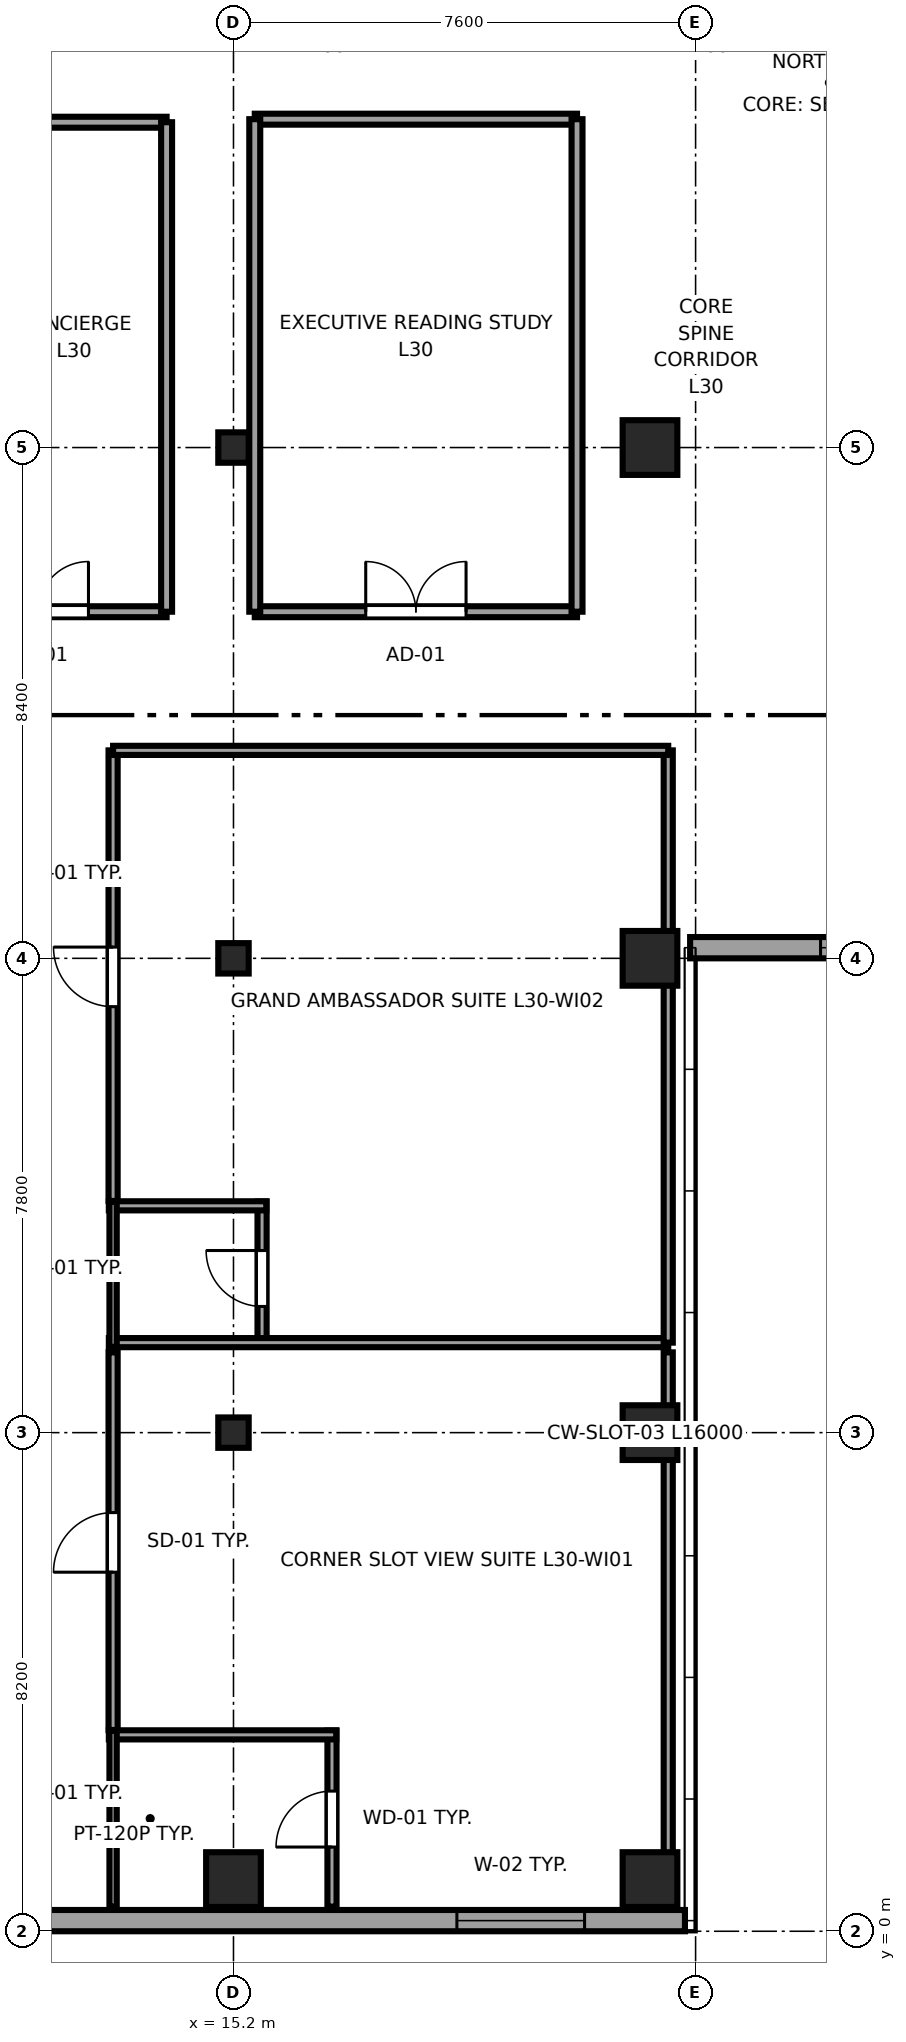
"""IFC4 building model, lengths in metres.
Left out: names, types, materials, properties, quantities, classifications, styles, units other than length and angle.
Written with IfcOpenShell. Run it as: python <this file> out.ifc"""

import sys

from ifc_helpers import new_model, si_unit, direction, frame, frame_2d, origin, origin_2d, place, context, subcontext, project, spatial, rectangle, i_section, extrude, source, transform, mapped, element, fill, save


model = new_model("IFC4")
c1 = context("Model", 3, precision=1e-05, world=origin(), true_north=direction((0.0, 1.0)))
c2 = subcontext(c1, "Body", "Model", "MODEL_VIEW")
j1 = project(units=[si_unit("LENGTHUNIT", "METRE"), si_unit("PLANEANGLEUNIT", "RADIAN")], contexts=[c1])
p1 = place(None, origin())
s1 = spatial("IfcSite", under=j1, at=p1, CompositionType="ELEMENT")
p2 = place(p1, origin())
s2 = spatial("IfcBuilding", under=s1, at=p2, CompositionType="ELEMENT")
p3 = place(p2, frame((0.0, 0.0, 118.65)))
s3 = spatial("IfcBuildingStorey", under=s2, at=p3, CompositionType="ELEMENT", Elevation=118.65)
m1 = source(origin(), c2, "Body", "SweptSolid", [
    extrude(rectangle(XDim=0.9, YDim=0.9, at=origin_2d()), origin(), (0.0, 0.0, 1.0), 3.55),
])
p4 = place(p3, frame((15.2, 0.85, 0.0), z_axis=(0.0, 0.0, 1.0), x_axis=(1.0, 0.0, 0.0)))
e1 = element("IfcColumn", 1, at=p4, inside=s3, PredefinedType="COLUMN", context=c2, shape_type="MappedRepresentation", body=[
    mapped(m1, transform((0.0, 0.0, 0.0), x_axis=(1.0, 0.0, 0.0), y_axis=(0.0, 1.0, 0.0), z_axis=(0.0, 0.0, 1.0), scale=1.0)),
])
m2 = source(origin(), c2, "Body", "SweptSolid", [
    extrude(i_section(OverallWidth=0.5, OverallDepth=0.5, WebThickness=0.022, FlangeThickness=0.034, at=origin_2d()), origin(), (0.0, 0.0, 1.0), 3.55),
])
for number, where, z_axis, x_axis in (
    (2, (15.2, 8.2, 0.0), (0.0, 0.0, 1.0), (1.0, 0.0, 0.0)),
    (3, (15.2, 16.0, 0.0), (0.0, 0.0, 1.0), (1.0, 0.0, 0.0)),
    (4, (15.2, 24.4, 0.0), (0.0, 0.0, 1.0), (1.0, 0.0, 0.0)),
):
    element("IfcColumn", number, at=place(p3, frame(where, z_axis=z_axis, x_axis=x_axis)), inside=s3, PredefinedType="COLUMN", context=c2, shape_type="MappedRepresentation", body=[
        mapped(m2, transform((0.0, 0.0, 0.0), x_axis=(1.0, 0.0, 0.0), y_axis=(0.0, 1.0, 0.0), z_axis=(0.0, 0.0, 1.0), scale=1.0)),
    ])
for number, where, z_axis, x_axis in (
    (5, (22.05, 0.85, 0.0), (0.0, 0.0, 1.0), (1.0, 0.0, 0.0)),
    (6, (22.05, 8.2, 0.0), (0.0, 0.0, 1.0), (1.0, 0.0, 0.0)),
    (7, (22.05, 16.0, 0.0), (0.0, 0.0, 1.0), (1.0, 0.0, 0.0)),
    (8, (22.05, 24.4, 0.0), (0.0, 0.0, 1.0), (1.0, 0.0, 0.0)),
):
    element("IfcColumn", number, at=place(p3, frame(where, z_axis=z_axis, x_axis=x_axis)), inside=s3, PredefinedType="COLUMN", context=c2, shape_type="MappedRepresentation", body=[
        mapped(m1, transform((0.0, 0.0, 0.0), x_axis=(1.0, 0.0, 0.0), y_axis=(0.0, 1.0, 0.0), z_axis=(0.0, 0.0, 1.0), scale=1.0)),
    ])
p5 = place(p3, frame((4.617, 0.175, 0.0), z_axis=(0.0, 0.0, 1.0), x_axis=(1.0, 0.0, 0.0)))
e9 = element("IfcWall", 9, at=p5, inside=s3, PredefinedType="SOLIDWALL", context=c2, shape_type="SweptSolid", body=[
    extrude(rectangle(XDim=18.008, YDim=0.35, at=frame_2d((9.004, 0.0))), origin(), (0.0, 0.0, 1.0), 3.37),
])
p6 = place(p5, frame((14.257, 0.0, 0.68)))
e10 = element("IfcOpeningElement", 10, at=p6, cuts=e9, PredefinedType="OPENING", context=c2, shape_type="SweptSolid", body=[
    extrude(rectangle(XDim=2.1, YDim=1.9, at=frame_2d((1.05, 0.95))), frame((0.0, 0.185, 0.0), z_axis=(0.0, -1.0, 0.0), x_axis=(1.0, 0.0, 0.0)), (0.0, 0.0, 1.0), 0.37),
])
p7 = place(p5, frame((2.591, 0.0, 0.62)))
e11 = element("IfcOpeningElement", 11, at=p7, cuts=e9, PredefinedType="OPENING", context=c2, shape_type="SweptSolid", body=[
    extrude(rectangle(XDim=1.5, YDim=1.55, at=frame_2d((0.75, 0.775))), frame((0.0, 0.185, 0.0), z_axis=(0.0, -1.0, 0.0), x_axis=(1.0, 0.0, 0.0)), (0.0, 0.0, 1.0), 0.37),
])
p8 = place(p3, frame((22.71, 16.175, 0.0), z_axis=(0.0, 0.0, 1.0), x_axis=(1.0, 0.0, 0.0)))
e12 = element("IfcWall", 12, at=p8, inside=s3, PredefinedType="SOLIDWALL", context=c2, shape_type="SweptSolid", body=[
    extrude(rectangle(XDim=11.58, YDim=0.35, at=frame_2d((5.79, 0.0))), origin(), (0.0, 0.0, 1.0), 2.748),
])
p9 = place(p8, frame((2.145, 0.0, 0.68)))
e13 = element("IfcOpeningElement", 13, at=p9, cuts=e12, PredefinedType="OPENING", context=c2, shape_type="SweptSolid", body=[
    extrude(rectangle(XDim=2.1, YDim=1.9, at=frame_2d((1.05, 0.95))), frame((0.0, 0.185, 0.0), z_axis=(0.0, -1.0, 0.0), x_axis=(1.0, 0.0, 0.0)), (0.0, 0.0, 1.0), 0.37),
])
p10 = place(p8, frame((7.335, 0.0, 0.68)))
e14 = element("IfcOpeningElement", 14, at=p10, cuts=e12, PredefinedType="OPENING", context=c2, shape_type="SweptSolid", body=[
    extrude(rectangle(XDim=2.1, YDim=1.9, at=frame_2d((1.05, 0.95))), frame((0.0, 0.185, 0.0), z_axis=(0.0, -1.0, 0.0), x_axis=(1.0, 0.0, 0.0)), (0.0, 0.0, 1.0), 0.37),
])
p11 = place(p3, frame((16.82, 0.405, 0.0), z_axis=(0.0, 0.0, 1.0), x_axis=(0.0, 1.0, 0.0)))
e15 = element("IfcWall", 15, at=p11, inside=s3, PredefinedType="PARTITIONING", context=c2, shape_type="SweptSolid", body=[
    extrude(rectangle(XDim=2.895, YDim=0.15, at=frame_2d((1.448, 0.0))), origin(), (0.0, 0.0, 1.0), 3.37),
])
p12 = place(p11, frame((0.98, 0.0, 0.0)))
e16 = element("IfcOpeningElement", 16, at=p12, cuts=e15, PredefinedType="OPENING", context=c2, shape_type="SweptSolid", body=[
    extrude(rectangle(XDim=0.92, YDim=2.01, at=frame_2d((0.46, 1.005))), frame((0.0, 0.085, 0.0), z_axis=(0.0, -1.0, 0.0), x_axis=(1.0, 0.0, 0.0)), (0.0, 0.0, 1.0), 0.17),
])
p13 = place(p3, frame((13.15, 3.23, 0.0), z_axis=(0.0, 0.0, 1.0), x_axis=(1.0, 0.0, 0.0)))
e17 = element("IfcWall", 17, at=p13, inside=s3, PredefinedType="PARTITIONING", context=c2, shape_type="SweptSolid", body=[
    extrude(rectangle(XDim=3.74, YDim=0.15, at=frame_2d((1.87, 0.0))), origin(), (0.0, 0.0, 1.0), 3.37),
])
p14 = place(p3, frame((13.22, 0.405, 0.0), z_axis=(0.0, 0.0, 1.0), x_axis=(0.0, 1.0, 0.0)))
e18 = element("IfcWall", 18, at=p14, inside=s3, PredefinedType="PLUMBINGWALL", context=c2, shape_type="SweptSolid", body=[
    extrude(rectangle(XDim=2.895, YDim=0.12, at=frame_2d((1.448, 0.0))), origin(), (0.0, 0.0, 1.0), 3.37),
])
p15 = place(p3, frame((15.67, 9.61, 0.0), z_axis=(0.0, 0.0, 1.0), x_axis=(0.0, 1.0, 0.0)))
e19 = element("IfcWall", 19, at=p15, inside=s3, PredefinedType="PARTITIONING", context=c2, shape_type="SweptSolid", body=[
    extrude(rectangle(XDim=2.39, YDim=0.15, at=frame_2d((1.195, 0.0))), origin(), (0.0, 0.0, 1.0), 3.37),
])
p16 = place(p15, frame((0.665, 0.0, 0.0)))
e20 = element("IfcOpeningElement", 20, at=p16, cuts=e19, PredefinedType="OPENING", context=c2, shape_type="SweptSolid", body=[
    extrude(rectangle(XDim=0.92, YDim=2.01, at=frame_2d((0.46, 1.005))), frame((0.0, 0.085, 0.0), z_axis=(0.0, -1.0, 0.0), x_axis=(1.0, 0.0, 0.0)), (0.0, 0.0, 1.0), 0.17),
])
p17 = place(p3, frame((13.15, 9.68, 0.0), z_axis=(0.0, 0.0, 1.0), x_axis=(1.0, 0.0, 0.0)))
e21 = element("IfcWall", 21, at=p17, inside=s3, PredefinedType="PARTITIONING", context=c2, shape_type="SweptSolid", body=[
    extrude(rectangle(XDim=9.2, YDim=0.15, at=frame_2d((4.6, 0.0))), origin(), (0.0, 0.0, 1.0), 3.37),
])
p18 = place(p3, frame((13.15, 11.93, 0.0), z_axis=(0.0, 0.0, 1.0), x_axis=(1.0, 0.0, 0.0)))
e22 = element("IfcWall", 22, at=p18, inside=s3, PredefinedType="PARTITIONING", context=c2, shape_type="SweptSolid", body=[
    extrude(rectangle(XDim=2.59, YDim=0.15, at=frame_2d((1.295, 0.0))), origin(), (0.0, 0.0, 1.0), 3.37),
])
p19 = place(p3, frame((13.22, 9.61, 0.0), z_axis=(0.0, 0.0, 1.0), x_axis=(0.0, 1.0, 0.0)))
e23 = element("IfcWall", 23, at=p19, inside=s3, PredefinedType="PLUMBINGWALL", context=c2, shape_type="SweptSolid", body=[
    extrude(rectangle(XDim=2.39, YDim=0.12, at=frame_2d((1.195, 0.0))), origin(), (0.0, 0.0, 1.0), 3.37),
])
p20 = place(p3, frame((13.22, 3.31, 0.0), z_axis=(0.0, 0.0, 1.0), x_axis=(0.0, 1.0, 0.0)))
e24 = element("IfcWall", 24, at=p20, inside=s3, PredefinedType="PARTITIONING", context=c2, shape_type="SweptSolid", body=[
    extrude(rectangle(XDim=6.21, YDim=0.15, at=frame_2d((3.105, 0.0))), origin(), (0.0, 0.0, 1.0), 3.37),
])
p21 = place(p20, frame((2.595, 0.0, 0.0)))
e25 = element("IfcOpeningElement", 25, at=p21, cuts=e24, PredefinedType="OPENING", context=c2, shape_type="SweptSolid", body=[
    extrude(rectangle(XDim=0.98, YDim=2.12, at=frame_2d((0.49, 1.06))), frame((0.0, 0.085, 0.0), z_axis=(0.0, -1.0, 0.0), x_axis=(1.0, 0.0, 0.0)), (0.0, 0.0, 1.0), 0.17),
])
p22 = place(p3, frame((22.35, 0.405, 0.0), z_axis=(0.0, 0.0, 1.0), x_axis=(0.0, 1.0, 0.0)))
e26 = element("IfcWall", 26, at=p22, inside=s3, PredefinedType="PARTITIONING", context=c2, shape_type="SweptSolid", body=[
    extrude(rectangle(XDim=9.115, YDim=0.15, at=frame_2d((4.558, 0.0))), origin(), (0.0, 0.0, 1.0), 3.37),
])
p23 = place(p3, frame((13.22, 12.01, 0.0), z_axis=(0.0, 0.0, 1.0), x_axis=(0.0, 1.0, 0.0)))
e27 = element("IfcWall", 27, at=p23, inside=s3, PredefinedType="PARTITIONING", context=c2, shape_type="SweptSolid", body=[
    extrude(rectangle(XDim=7.41, YDim=0.15, at=frame_2d((3.705, 0.0))), origin(), (0.0, 0.0, 1.0), 3.37),
])
p24 = place(p23, frame((3.195, 0.0, 0.0)))
e28 = element("IfcOpeningElement", 28, at=p24, cuts=e27, PredefinedType="OPENING", context=c2, shape_type="SweptSolid", body=[
    extrude(rectangle(XDim=0.98, YDim=2.12, at=frame_2d((0.49, 1.06))), frame((0.0, 0.085, 0.0), z_axis=(0.0, -1.0, 0.0), x_axis=(1.0, 0.0, 0.0)), (0.0, 0.0, 1.0), 0.17),
])
p25 = place(p3, frame((22.35, 9.68, 0.0), z_axis=(0.0, 0.0, 1.0), x_axis=(0.0, 1.0, 0.0)))
e29 = element("IfcWall", 29, at=p25, inside=s3, PredefinedType="PARTITIONING", context=c2, shape_type="SweptSolid", body=[
    extrude(rectangle(XDim=9.74, YDim=0.15, at=frame_2d((4.87, 0.0))), origin(), (0.0, 0.0, 1.0), 3.37),
])
p26 = place(p3, frame((13.22, 19.42, 0.0), z_axis=(0.0, 0.0, 1.0), x_axis=(1.0, 0.0, 0.0)))
e30 = element("IfcWall", 30, at=p26, inside=s3, PredefinedType="PARTITIONING", context=c2, shape_type="SweptSolid", body=[
    extrude(rectangle(XDim=9.13, YDim=0.15, at=frame_2d((4.565, 0.0))), origin(), (0.0, 0.0, 1.0), 3.37),
])
p27 = place(p3, frame((9.88, 21.7, 0.0), z_axis=(0.0, 0.0, 1.0), x_axis=(1.0, 0.0, 0.0)))
e31 = element("IfcWall", 31, at=p27, inside=s3, PredefinedType="PARTITIONING", context=c2, shape_type="SweptSolid", body=[
    extrude(rectangle(XDim=4.22, YDim=0.18, at=frame_2d((2.11, 0.0))), origin(), (0.0, 0.0, 1.0), 3.37),
])
p28 = place(p27, frame((1.285, 0.0, 0.0)))
e32 = element("IfcOpeningElement", 32, at=p28, cuts=e31, PredefinedType="OPENING", context=c2, shape_type="SweptSolid", body=[
    extrude(rectangle(XDim=1.65, YDim=2.15, at=frame_2d((0.825, 1.075))), frame((0.0, 0.1, 0.0), z_axis=(0.0, -1.0, 0.0), x_axis=(1.0, 0.0, 0.0)), (0.0, 0.0, 1.0), 0.2),
])
p29 = place(p3, frame((9.88, 29.75, 0.0), z_axis=(0.0, 0.0, 1.0), x_axis=(1.0, 0.0, 0.0)))
e33 = element("IfcWall", 33, at=p29, inside=s3, PredefinedType="PARTITIONING", context=c2, shape_type="SweptSolid", body=[
    extrude(rectangle(XDim=4.22, YDim=0.18, at=frame_2d((2.11, 0.0))), origin(), (0.0, 0.0, 1.0), 3.37),
])
p30 = place(p3, frame((14.1, 21.7, 0.0), z_axis=(0.0, 0.0, 1.0), x_axis=(0.0, 1.0, 0.0)))
e34 = element("IfcWall", 34, at=p30, inside=s3, PredefinedType="PARTITIONING", context=c2, shape_type="SweptSolid", body=[
    extrude(rectangle(XDim=8.05, YDim=0.18, at=frame_2d((4.025, 0.0))), origin(), (0.0, 0.0, 1.0), 3.37),
])
p31 = place(p3, frame((15.55, 21.7, 0.0), z_axis=(0.0, 0.0, 1.0), x_axis=(1.0, 0.0, 0.0)))
e35 = element("IfcWall", 35, at=p31, inside=s3, PredefinedType="PARTITIONING", context=c2, shape_type="SweptSolid", body=[
    extrude(rectangle(XDim=5.3, YDim=0.18, at=frame_2d((2.65, 0.0))), origin(), (0.0, 0.0, 1.0), 3.37),
])
p32 = place(p31, frame((1.825, 0.0, 0.0)))
e36 = element("IfcOpeningElement", 36, at=p32, cuts=e35, PredefinedType="OPENING", context=c2, shape_type="SweptSolid", body=[
    extrude(rectangle(XDim=1.65, YDim=2.15, at=frame_2d((0.825, 1.075))), frame((0.0, 0.1, 0.0), z_axis=(0.0, -1.0, 0.0), x_axis=(1.0, 0.0, 0.0)), (0.0, 0.0, 1.0), 0.2),
])
p33 = place(p3, frame((15.55, 29.8, 0.0), z_axis=(0.0, 0.0, 1.0), x_axis=(1.0, 0.0, 0.0)))
e37 = element("IfcWall", 37, at=p33, inside=s3, PredefinedType="PARTITIONING", context=c2, shape_type="SweptSolid", body=[
    extrude(rectangle(XDim=5.3, YDim=0.18, at=frame_2d((2.65, 0.0))), origin(), (0.0, 0.0, 1.0), 3.37),
])
for number, where, z_axis, x_axis in (
    (38, (15.55, 21.7, 0.0), (0.0, 0.0, 1.0), (0.0, 1.0, 0.0)),
    (39, (20.85, 21.7, 0.0), (0.0, 0.0, 1.0), (0.0, 1.0, 0.0)),
):
    element("IfcWall", number, at=place(p3, frame(where, z_axis=z_axis, x_axis=x_axis)), inside=s3, PredefinedType="PARTITIONING", context=c2, shape_type="SweptSolid", body=[
        extrude(rectangle(XDim=8.1, YDim=0.18, at=frame_2d((4.05, 0.0))), origin(), (0.0, 0.0, 1.0), 3.37),
    ])
m3 = source(origin(), c2, "Body", "SweptSolid", [
    extrude(rectangle(XDim=2.1, YDim=1.9, at=frame_2d((1.05, 0.95))), frame((0.0, 0.09, 0.0), z_axis=(0.0, -1.0, 0.0), x_axis=(1.0, 0.0, 0.0)), (0.0, 0.0, 1.0), 0.06),
])
p34 = place(p6, origin())
e40 = element("IfcWindow", 40, at=p34, inside=s3, PartitioningType="TRIPLE_PANEL_HORIZONTAL", PredefinedType="WINDOW", context=c2, shape_type="MappedRepresentation", body=[
    mapped(m3, transform((0.0, 0.0, 0.0), x_axis=(1.0, 0.0, 0.0), y_axis=(0.0, 1.0, 0.0), z_axis=(0.0, 0.0, 1.0), scale=1.0)),
])
fill(e10, e40)
p35 = place(p9, origin())
e41 = element("IfcWindow", 41, at=p35, inside=s3, PartitioningType="TRIPLE_PANEL_HORIZONTAL", PredefinedType="WINDOW", context=c2, shape_type="MappedRepresentation", body=[
    mapped(m3, transform((0.0, 0.0, 0.0), x_axis=(1.0, 0.0, 0.0), y_axis=(0.0, 1.0, 0.0), z_axis=(0.0, 0.0, 1.0), scale=1.0)),
])
fill(e13, e41)
m4 = source(origin(), c2, "Body", "SweptSolid", [
    extrude(rectangle(XDim=0.92, YDim=2.01, at=frame_2d((0.46, 1.005))), frame((0.0, 0.025, 0.0), z_axis=(0.0, -1.0, 0.0), x_axis=(1.0, 0.0, 0.0)), (0.0, 0.0, 1.0), 0.05),
])
p36 = place(p12, origin())
e42 = element("IfcDoor", 42, at=p36, inside=s3, OperationType="SINGLE_SWING_LEFT", PredefinedType="DOOR", context=c2, shape_type="MappedRepresentation", body=[
    mapped(m4, transform((0.0, 0.0, 0.0), x_axis=(1.0, 0.0, 0.0), y_axis=(0.0, 1.0, 0.0), z_axis=(0.0, 0.0, 1.0), scale=1.0)),
])
fill(e16, e42)
p37 = place(p16, origin())
e43 = element("IfcDoor", 43, at=p37, inside=s3, OperationType="SINGLE_SWING_RIGHT", PredefinedType="DOOR", context=c2, shape_type="MappedRepresentation", body=[
    mapped(m4, transform((0.0, 0.0, 0.0), x_axis=(1.0, 0.0, 0.0), y_axis=(0.0, 1.0, 0.0), z_axis=(0.0, 0.0, 1.0), scale=1.0)),
])
fill(e20, e43)
m5 = source(origin(), c2, "Body", "SweptSolid", [
    extrude(rectangle(XDim=0.98, YDim=2.12, at=frame_2d((0.49, 1.06))), frame((0.0, 0.025, 0.0), z_axis=(0.0, -1.0, 0.0), x_axis=(1.0, 0.0, 0.0)), (0.0, 0.0, 1.0), 0.05),
])
p38 = place(p21, origin())
e44 = element("IfcDoor", 44, at=p38, inside=s3, OperationType="SINGLE_SWING_LEFT", PredefinedType="DOOR", context=c2, shape_type="MappedRepresentation", body=[
    mapped(m5, transform((0.0, 0.0, 0.0), x_axis=(1.0, 0.0, 0.0), y_axis=(0.0, 1.0, 0.0), z_axis=(0.0, 0.0, 1.0), scale=1.0)),
])
fill(e25, e44)
p39 = place(p24, origin())
e45 = element("IfcDoor", 45, at=p39, inside=s3, OperationType="SINGLE_SWING_RIGHT", PredefinedType="DOOR", context=c2, shape_type="MappedRepresentation", body=[
    mapped(m5, transform((0.0, 0.0, 0.0), x_axis=(1.0, 0.0, 0.0), y_axis=(0.0, 1.0, 0.0), z_axis=(0.0, 0.0, 1.0), scale=1.0)),
])
fill(e28, e45)
m6 = source(origin(), c2, "Body", "SweptSolid", [
    extrude(rectangle(XDim=1.65, YDim=2.15, at=frame_2d((0.825, 1.075))), frame((0.0, 0.025, 0.0), z_axis=(0.0, -1.0, 0.0), x_axis=(1.0, 0.0, 0.0)), (0.0, 0.0, 1.0), 0.05),
])
p40 = place(p28, origin())
e46 = element("IfcDoor", 46, at=p40, inside=s3, OperationType="DOUBLE_DOOR_SINGLE_SWING", PredefinedType="DOOR", context=c2, shape_type="MappedRepresentation", body=[
    mapped(m6, transform((0.0, 0.0, 0.0), x_axis=(1.0, 0.0, 0.0), y_axis=(0.0, 1.0, 0.0), z_axis=(0.0, 0.0, 1.0), scale=1.0)),
])
fill(e32, e46)
p41 = place(p32, origin())
e47 = element("IfcDoor", 47, at=p41, inside=s3, OperationType="DOUBLE_DOOR_SINGLE_SWING", PredefinedType="DOOR", context=c2, shape_type="MappedRepresentation", body=[
    mapped(m6, transform((0.0, 0.0, 0.0), x_axis=(1.0, 0.0, 0.0), y_axis=(0.0, 1.0, 0.0), z_axis=(0.0, 0.0, 1.0), scale=1.0)),
])
fill(e36, e47)
save(model, sys.argv[1])
